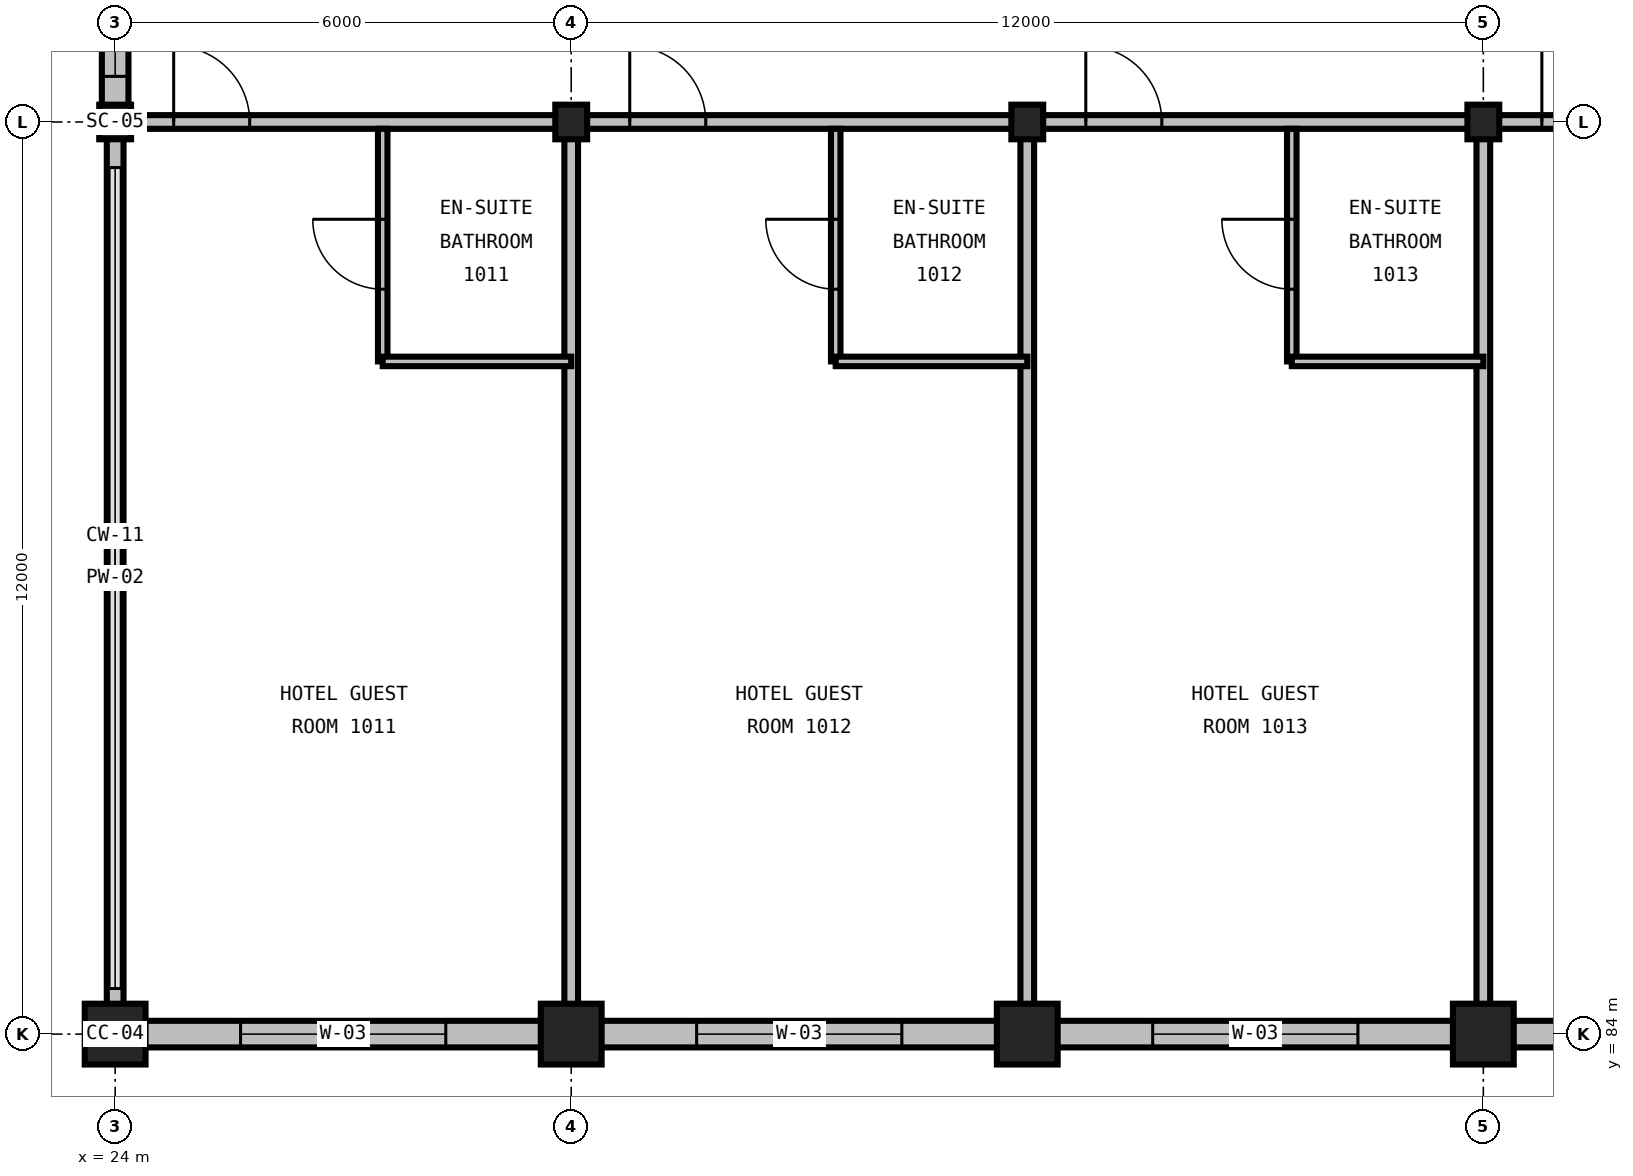
"""IFC4 building model, lengths in metres.
Left out: names, types, materials, properties, quantities, classifications, styles, units other than length and angle.
Written with IfcOpenShell. Run it as: python <this file> out.ifc"""

import sys

from ifc_helpers import new_model, si_unit, direction, frame, frame_2d, origin, origin_2d, place, context, subcontext, project, spatial, rectangle, i_section, extrude, element, fill, save


model = new_model("IFC4")
c1 = context("Model", 3, precision=1e-05, world=origin(), true_north=direction((0.0, 1.0)))
c2 = subcontext(c1, "Body", "Model", "MODEL_VIEW")
j1 = project(units=[si_unit("LENGTHUNIT", "METRE"), si_unit("PLANEANGLEUNIT", "RADIAN")], contexts=[c1])
p1 = place(None, origin())
s1 = spatial("IfcSite", under=j1, at=p1, CompositionType="ELEMENT")
p2 = place(p1, origin())
s2 = spatial("IfcBuilding", under=s1, at=p2, CompositionType="ELEMENT")
p3 = place(p2, frame((0.0, 0.0, 45.6)))
s3 = spatial("IfcBuildingStorey", under=s2, at=p3, CompositionType="ELEMENT", Elevation=45.6)
p4 = place(p3, frame((24.0, 84.0, 0.0), z_axis=(0.0, 0.0, 1.0), x_axis=(1.0, 0.0, 0.0)))
e1 = element("IfcColumn", 1, at=p4, inside=s3, PredefinedType="COLUMN", context=c2, shape_type="SweptSolid", body=[
    extrude(rectangle(XDim=0.8, YDim=0.8, at=origin_2d()), origin(), (0.0, 0.0, 1.0), 3.6),
])
p5 = place(p3, frame((24.0, 96.0, 0.0), z_axis=(0.0, 0.0, 1.0), x_axis=(1.0, 0.0, 0.0)))
e2 = element("IfcColumn", 2, at=p5, inside=s3, PredefinedType="COLUMN", context=c2, shape_type="SweptSolid", body=[
    extrude(i_section(OverallWidth=0.419, OverallDepth=0.455, WebThickness=0.042, FlangeThickness=0.068, FilletRadius=0.031, at=origin_2d()), origin(), (0.0, 0.0, 1.0), 3.6),
])
p6 = place(p3, frame((30.0, 84.0, 0.0), z_axis=(0.0, 0.0, 1.0), x_axis=(1.0, 0.0, 0.0)))
e3 = element("IfcColumn", 3, at=p6, inside=s3, PredefinedType="COLUMN", context=c2, shape_type="SweptSolid", body=[
    extrude(rectangle(XDim=0.8, YDim=0.8, at=origin_2d()), origin(), (0.0, 0.0, 1.0), 3.6),
])
p7 = place(p3, frame((30.0, 96.0, 0.0), z_axis=(0.0, 0.0, 1.0), x_axis=(1.0, 0.0, 0.0)))
e4 = element("IfcColumn", 4, at=p7, inside=s3, PredefinedType="COLUMN", context=c2, shape_type="SweptSolid", body=[
    extrude(i_section(OverallWidth=0.419, OverallDepth=0.455, WebThickness=0.042, FlangeThickness=0.068, FilletRadius=0.031, at=origin_2d()), origin(), (0.0, 0.0, 1.0), 3.6),
])
p8 = place(p3, frame((36.0, 84.0, 0.0), z_axis=(0.0, 0.0, 1.0), x_axis=(1.0, 0.0, 0.0)))
e5 = element("IfcColumn", 5, at=p8, inside=s3, PredefinedType="COLUMN", context=c2, shape_type="SweptSolid", body=[
    extrude(rectangle(XDim=0.8, YDim=0.8, at=origin_2d()), origin(), (0.0, 0.0, 1.0), 3.6),
])
p9 = place(p3, frame((36.0, 96.0, 0.0), z_axis=(0.0, 0.0, 1.0), x_axis=(1.0, 0.0, 0.0)))
e6 = element("IfcColumn", 6, at=p9, inside=s3, PredefinedType="COLUMN", context=c2, shape_type="SweptSolid", body=[
    extrude(i_section(OverallWidth=0.419, OverallDepth=0.455, WebThickness=0.042, FlangeThickness=0.068, FilletRadius=0.031, at=origin_2d()), origin(), (0.0, 0.0, 1.0), 3.6),
])
p10 = place(p3, frame((42.0, 84.0, 0.0), z_axis=(0.0, 0.0, 1.0), x_axis=(1.0, 0.0, 0.0)))
e7 = element("IfcColumn", 7, at=p10, inside=s3, PredefinedType="COLUMN", context=c2, shape_type="SweptSolid", body=[
    extrude(rectangle(XDim=0.8, YDim=0.8, at=origin_2d()), origin(), (0.0, 0.0, 1.0), 3.6),
])
p11 = place(p3, frame((42.0, 96.0, 0.0), z_axis=(0.0, 0.0, 1.0), x_axis=(1.0, 0.0, 0.0)))
e8 = element("IfcColumn", 8, at=p11, inside=s3, PredefinedType="COLUMN", context=c2, shape_type="SweptSolid", body=[
    extrude(i_section(OverallWidth=0.419, OverallDepth=0.455, WebThickness=0.042, FlangeThickness=0.068, FilletRadius=0.031, at=origin_2d()), origin(), (0.0, 0.0, 1.0), 3.6),
])
p12 = place(p3, frame((24.0, 84.0, 0.0), z_axis=(0.0, 0.0, 1.0), x_axis=(1.0, 0.0, 0.0)))
e9 = element("IfcWall", 9, at=p12, inside=s3, PredefinedType="STANDARD", context=c2, shape_type="SweptSolid", body=[
    extrude(rectangle(XDim=6.0, YDim=0.35, at=frame_2d((3.0, 0.0))), origin(), (0.0, 0.0, 1.0), 2.486),
])
p13 = place(p12, frame((1.65, 0.0, 0.72)))
e10 = element("IfcOpeningElement", 10, at=p13, cuts=e9, PredefinedType="OPENING", context=c2, shape_type="SweptSolid", body=[
    extrude(rectangle(XDim=2.7, YDim=1.65, at=frame_2d((1.35, 0.825))), frame((0.0, 0.19, 0.0), z_axis=(0.0, -1.0, 0.0), x_axis=(1.0, 0.0, 0.0)), (0.0, 0.0, 1.0), 0.38),
])
p14 = place(p3, frame((30.0, 84.0, 0.0), z_axis=(0.0, 0.0, 1.0), x_axis=(1.0, 0.0, 0.0)))
e11 = element("IfcWall", 11, at=p14, inside=s3, PredefinedType="STANDARD", context=c2, shape_type="SweptSolid", body=[
    extrude(rectangle(XDim=6.0, YDim=0.35, at=frame_2d((3.0, 0.0))), origin(), (0.0, 0.0, 1.0), 2.486),
])
p15 = place(p14, frame((1.65, 0.0, 0.72)))
e12 = element("IfcOpeningElement", 12, at=p15, cuts=e11, PredefinedType="OPENING", context=c2, shape_type="SweptSolid", body=[
    extrude(rectangle(XDim=2.7, YDim=1.65, at=frame_2d((1.35, 0.825))), frame((0.0, 0.19, 0.0), z_axis=(0.0, -1.0, 0.0), x_axis=(1.0, 0.0, 0.0)), (0.0, 0.0, 1.0), 0.38),
])
p16 = place(p3, frame((36.0, 84.0, 0.0), z_axis=(0.0, 0.0, 1.0), x_axis=(1.0, 0.0, 0.0)))
e13 = element("IfcWall", 13, at=p16, inside=s3, PredefinedType="STANDARD", context=c2, shape_type="SweptSolid", body=[
    extrude(rectangle(XDim=6.0, YDim=0.35, at=frame_2d((3.0, 0.0))), origin(), (0.0, 0.0, 1.0), 2.486),
])
p17 = place(p16, frame((1.65, 0.0, 0.72)))
e14 = element("IfcOpeningElement", 14, at=p17, cuts=e13, PredefinedType="OPENING", context=c2, shape_type="SweptSolid", body=[
    extrude(rectangle(XDim=2.7, YDim=1.65, at=frame_2d((1.35, 0.825))), frame((0.0, 0.19, 0.0), z_axis=(0.0, -1.0, 0.0), x_axis=(1.0, 0.0, 0.0)), (0.0, 0.0, 1.0), 0.38),
])
p18 = place(p3, frame((42.0, 84.0, 0.0), z_axis=(0.0, 0.0, 1.0), x_axis=(1.0, 0.0, 0.0)))
e15 = element("IfcWall", 15, at=p18, inside=s3, PredefinedType="STANDARD", context=c2, shape_type="SweptSolid", body=[
    extrude(rectangle(XDim=12.0, YDim=0.35, at=frame_2d((6.0, 0.0))), origin(), (0.0, 0.0, 1.0), 2.486),
])
p19 = place(p18, frame((1.65, 0.0, 0.72)))
e16 = element("IfcOpeningElement", 16, at=p19, cuts=e15, PredefinedType="OPENING", context=c2, shape_type="SweptSolid", body=[
    extrude(rectangle(XDim=2.7, YDim=1.65, at=frame_2d((1.35, 0.825))), frame((0.0, 0.19, 0.0), z_axis=(0.0, -1.0, 0.0), x_axis=(1.0, 0.0, 0.0)), (0.0, 0.0, 1.0), 0.38),
])
p20 = place(p18, frame((7.65, 0.0, 0.72)))
e17 = element("IfcOpeningElement", 17, at=p20, cuts=e15, PredefinedType="OPENING", context=c2, shape_type="SweptSolid", body=[
    extrude(rectangle(XDim=2.7, YDim=1.65, at=frame_2d((1.35, 0.825))), frame((0.0, 0.19, 0.0), z_axis=(0.0, -1.0, 0.0), x_axis=(1.0, 0.0, 0.0)), (0.0, 0.0, 1.0), 0.38),
])
p21 = place(p3, frame((24.0, 96.0, 0.0), z_axis=(0.0, 0.0, 1.0), x_axis=(0.0, -1.0, 0.0)))
e18 = element("IfcWall", 18, at=p21, inside=s3, PredefinedType="PARAPET", context=c2, shape_type="SweptSolid", body=[
    extrude(rectangle(XDim=12.0, YDim=0.22, at=frame_2d((6.0, 0.0))), origin(), (0.0, 0.0, 1.0), 0.2),
])
p22 = place(p3, frame((24.0, 105.0, 0.0), z_axis=(0.0, 0.0, 1.0), x_axis=(0.0, -1.0, 0.0)))
e19 = element("IfcWall", 19, at=p22, inside=s3, PredefinedType="STANDARD", context=c2, shape_type="SweptSolid", body=[
    extrude(rectangle(XDim=9.0, YDim=0.35, at=frame_2d((4.5, 0.0))), origin(), (0.0, 0.0, 1.0), 2.981),
])
p23 = place(p22, frame((6.6, 0.0, 0.85)))
e20 = element("IfcOpeningElement", 20, at=p23, cuts=e19, PredefinedType="OPENING", context=c2, shape_type="SweptSolid", body=[
    extrude(rectangle(XDim=1.8, YDim=1.5, at=frame_2d((0.9, 0.75))), frame((0.0, 0.19, 0.0), z_axis=(0.0, -1.0, 0.0), x_axis=(1.0, 0.0, 0.0)), (0.0, 0.0, 1.0), 0.38),
])
p24 = place(p3, frame((24.085, 96.0, 0.0), z_axis=(0.0, 0.0, 1.0), x_axis=(1.0, 0.0, 0.0)))
e21 = element("IfcWall", 21, at=p24, inside=s3, PredefinedType="PARTITIONING", context=c2, shape_type="SweptSolid", body=[
    extrude(rectangle(XDim=5.915, YDim=0.18, at=frame_2d((2.957, 0.0))), origin(), (0.0, 0.0, 1.0), 2.736),
])
p25 = place(p24, frame((0.685, 0.0, 0.0)))
e22 = element("IfcOpeningElement", 22, at=p25, cuts=e21, PredefinedType="OPENING", context=c2, shape_type="SweptSolid", body=[
    extrude(rectangle(XDim=1.0, YDim=2.15, at=frame_2d((0.5, 1.075))), frame((0.0, 0.105, 0.0), z_axis=(0.0, -1.0, 0.0), x_axis=(1.0, 0.0, 0.0)), (0.0, 0.0, 1.0), 0.21),
])
p26 = place(p3, frame((30.0, 84.175, 0.0), z_axis=(0.0, 0.0, 1.0), x_axis=(0.0, 1.0, 0.0)))
e23 = element("IfcWall", 23, at=p26, inside=s3, PredefinedType="PARTITIONING", context=c2, shape_type="SweptSolid", body=[
    extrude(rectangle(XDim=11.825, YDim=0.18, at=frame_2d((5.913, 0.0))), origin(), (0.0, 0.0, 1.0), 2.59),
])
p27 = place(p3, frame((27.52, 92.85, 0.0), z_axis=(0.0, 0.0, 1.0), x_axis=(0.0, 1.0, 0.0)))
e24 = element("IfcWall", 24, at=p27, inside=s3, PredefinedType="PARTITIONING", context=c2, shape_type="SweptSolid", body=[
    extrude(rectangle(XDim=3.06, YDim=0.125, at=frame_2d((1.53, 0.0))), origin(), (0.0, 0.0, 1.0), 3.29),
])
p28 = place(p27, frame((0.95, 0.0, 0.0)))
e25 = element("IfcOpeningElement", 25, at=p28, cuts=e24, PredefinedType="OPENING", context=c2, shape_type="SweptSolid", body=[
    extrude(rectangle(XDim=0.92, YDim=2.1, at=frame_2d((0.46, 1.05))), frame((0.0, 0.077, 0.0), z_axis=(0.0, -1.0, 0.0), x_axis=(1.0, 0.0, 0.0)), (0.0, 0.0, 1.0), 0.155),
])
p29 = place(p3, frame((27.52, 92.85, 0.0), z_axis=(0.0, 0.0, 1.0), x_axis=(1.0, 0.0, 0.0)))
e26 = element("IfcWall", 26, at=p29, inside=s3, PredefinedType="PARTITIONING", context=c2, shape_type="SweptSolid", body=[
    extrude(rectangle(XDim=2.48, YDim=0.125, at=frame_2d((1.24, 0.0))), origin(), (0.0, 0.0, 1.0), 3.29),
])
p30 = place(p3, frame((30.0, 96.0, 0.0), z_axis=(0.0, 0.0, 1.0), x_axis=(1.0, 0.0, 0.0)))
e27 = element("IfcWall", 27, at=p30, inside=s3, PredefinedType="PARTITIONING", context=c2, shape_type="SweptSolid", body=[
    extrude(rectangle(XDim=6.0, YDim=0.18, at=frame_2d((3.0, 0.0))), origin(), (0.0, 0.0, 1.0), 2.736),
])
p31 = place(p30, frame((0.77, 0.0, 0.0)))
e28 = element("IfcOpeningElement", 28, at=p31, cuts=e27, PredefinedType="OPENING", context=c2, shape_type="SweptSolid", body=[
    extrude(rectangle(XDim=1.0, YDim=2.15, at=frame_2d((0.5, 1.075))), frame((0.0, 0.105, 0.0), z_axis=(0.0, -1.0, 0.0), x_axis=(1.0, 0.0, 0.0)), (0.0, 0.0, 1.0), 0.21),
])
p32 = place(p3, frame((36.0, 84.175, 0.0), z_axis=(0.0, 0.0, 1.0), x_axis=(0.0, 1.0, 0.0)))
e29 = element("IfcWall", 29, at=p32, inside=s3, PredefinedType="PARTITIONING", context=c2, shape_type="SweptSolid", body=[
    extrude(rectangle(XDim=11.825, YDim=0.18, at=frame_2d((5.913, 0.0))), origin(), (0.0, 0.0, 1.0), 2.59),
])
p33 = place(p3, frame((33.48, 92.85, 0.0), z_axis=(0.0, 0.0, 1.0), x_axis=(0.0, 1.0, 0.0)))
e30 = element("IfcWall", 30, at=p33, inside=s3, PredefinedType="PARTITIONING", context=c2, shape_type="SweptSolid", body=[
    extrude(rectangle(XDim=3.06, YDim=0.125, at=frame_2d((1.53, 0.0))), origin(), (0.0, 0.0, 1.0), 3.29),
])
p34 = place(p33, frame((0.95, 0.0, 0.0)))
e31 = element("IfcOpeningElement", 31, at=p34, cuts=e30, PredefinedType="OPENING", context=c2, shape_type="SweptSolid", body=[
    extrude(rectangle(XDim=0.92, YDim=2.1, at=frame_2d((0.46, 1.05))), frame((0.0, 0.077, 0.0), z_axis=(0.0, -1.0, 0.0), x_axis=(1.0, 0.0, 0.0)), (0.0, 0.0, 1.0), 0.155),
])
p35 = place(p3, frame((33.48, 92.85, 0.0), z_axis=(0.0, 0.0, 1.0), x_axis=(1.0, 0.0, 0.0)))
e32 = element("IfcWall", 32, at=p35, inside=s3, PredefinedType="PARTITIONING", context=c2, shape_type="SweptSolid", body=[
    extrude(rectangle(XDim=2.52, YDim=0.125, at=frame_2d((1.26, 0.0))), origin(), (0.0, 0.0, 1.0), 3.29),
])
p36 = place(p3, frame((36.0, 96.0, 0.0), z_axis=(0.0, 0.0, 1.0), x_axis=(1.0, 0.0, 0.0)))
e33 = element("IfcWall", 33, at=p36, inside=s3, PredefinedType="PARTITIONING", context=c2, shape_type="SweptSolid", body=[
    extrude(rectangle(XDim=6.0, YDim=0.18, at=frame_2d((3.0, 0.0))), origin(), (0.0, 0.0, 1.0), 2.736),
])
p37 = place(p36, frame((0.77, 0.0, 0.0)))
e34 = element("IfcOpeningElement", 34, at=p37, cuts=e33, PredefinedType="OPENING", context=c2, shape_type="SweptSolid", body=[
    extrude(rectangle(XDim=1.0, YDim=2.15, at=frame_2d((0.5, 1.075))), frame((0.0, 0.105, 0.0), z_axis=(0.0, -1.0, 0.0), x_axis=(1.0, 0.0, 0.0)), (0.0, 0.0, 1.0), 0.21),
])
p38 = place(p3, frame((42.0, 84.175, 0.0), z_axis=(0.0, 0.0, 1.0), x_axis=(0.0, 1.0, 0.0)))
e35 = element("IfcWall", 35, at=p38, inside=s3, PredefinedType="PARTITIONING", context=c2, shape_type="SweptSolid", body=[
    extrude(rectangle(XDim=11.825, YDim=0.18, at=frame_2d((5.913, 0.0))), origin(), (0.0, 0.0, 1.0), 2.59),
])
p39 = place(p3, frame((39.48, 92.85, 0.0), z_axis=(0.0, 0.0, 1.0), x_axis=(0.0, 1.0, 0.0)))
e36 = element("IfcWall", 36, at=p39, inside=s3, PredefinedType="PARTITIONING", context=c2, shape_type="SweptSolid", body=[
    extrude(rectangle(XDim=3.06, YDim=0.125, at=frame_2d((1.53, 0.0))), origin(), (0.0, 0.0, 1.0), 3.29),
])
p40 = place(p39, frame((0.95, 0.0, 0.0)))
e37 = element("IfcOpeningElement", 37, at=p40, cuts=e36, PredefinedType="OPENING", context=c2, shape_type="SweptSolid", body=[
    extrude(rectangle(XDim=0.92, YDim=2.1, at=frame_2d((0.46, 1.05))), frame((0.0, 0.077, 0.0), z_axis=(0.0, -1.0, 0.0), x_axis=(1.0, 0.0, 0.0)), (0.0, 0.0, 1.0), 0.155),
])
p41 = place(p3, frame((39.48, 92.85, 0.0), z_axis=(0.0, 0.0, 1.0), x_axis=(1.0, 0.0, 0.0)))
e38 = element("IfcWall", 38, at=p41, inside=s3, PredefinedType="PARTITIONING", context=c2, shape_type="SweptSolid", body=[
    extrude(rectangle(XDim=2.52, YDim=0.125, at=frame_2d((1.26, 0.0))), origin(), (0.0, 0.0, 1.0), 3.29),
])
p42 = place(p3, frame((42.0, 96.0, 0.0), z_axis=(0.0, 0.0, 1.0), x_axis=(1.0, 0.0, 0.0)))
e39 = element("IfcWall", 39, at=p42, inside=s3, PredefinedType="PARTITIONING", context=c2, shape_type="SweptSolid", body=[
    extrude(rectangle(XDim=6.0, YDim=0.18, at=frame_2d((3.0, 0.0))), origin(), (0.0, 0.0, 1.0), 2.359),
])
p43 = place(p42, frame((0.77, 0.0, 0.0)))
e40 = element("IfcOpeningElement", 40, at=p43, cuts=e39, PredefinedType="OPENING", context=c2, shape_type="SweptSolid", body=[
    extrude(rectangle(XDim=1.0, YDim=2.15, at=frame_2d((0.5, 1.075))), frame((0.0, 0.105, 0.0), z_axis=(0.0, -1.0, 0.0), x_axis=(1.0, 0.0, 0.0)), (0.0, 0.0, 1.0), 0.21),
])
p44 = place(p13, origin())
e41 = element("IfcWindow", 41, at=p44, inside=s3, PartitioningType="TRIPLE_PANEL_VERTICAL", PredefinedType="WINDOW", context=c2, shape_type="SweptSolid", body=[
    extrude(rectangle(XDim=2.7, YDim=1.65, at=frame_2d((1.35, 0.825))), frame((0.0, 0.03, 0.0), z_axis=(0.0, -1.0, 0.0), x_axis=(1.0, 0.0, 0.0)), (0.0, 0.0, 1.0), 0.06),
])
fill(e10, e41)
p45 = place(p15, origin())
e42 = element("IfcWindow", 42, at=p45, inside=s3, PartitioningType="TRIPLE_PANEL_VERTICAL", PredefinedType="WINDOW", context=c2, shape_type="SweptSolid", body=[
    extrude(rectangle(XDim=2.7, YDim=1.65, at=frame_2d((1.35, 0.825))), frame((0.0, 0.03, 0.0), z_axis=(0.0, -1.0, 0.0), x_axis=(1.0, 0.0, 0.0)), (0.0, 0.0, 1.0), 0.06),
])
fill(e12, e42)
p46 = place(p17, origin())
e43 = element("IfcWindow", 43, at=p46, inside=s3, PartitioningType="TRIPLE_PANEL_VERTICAL", PredefinedType="WINDOW", context=c2, shape_type="SweptSolid", body=[
    extrude(rectangle(XDim=2.7, YDim=1.65, at=frame_2d((1.35, 0.825))), frame((0.0, 0.03, 0.0), z_axis=(0.0, -1.0, 0.0), x_axis=(1.0, 0.0, 0.0)), (0.0, 0.0, 1.0), 0.06),
])
fill(e14, e43)
p47 = place(p23, origin())
e44 = element("IfcWindow", 44, at=p47, inside=s3, PartitioningType="SINGLE_PANEL", PredefinedType="WINDOW", context=c2, shape_type="SweptSolid", body=[
    extrude(rectangle(XDim=1.8, YDim=1.5, at=frame_2d((0.9, 0.75))), frame((0.0, 0.03, 0.0), z_axis=(0.0, -1.0, 0.0), x_axis=(1.0, 0.0, 0.0)), (0.0, 0.0, 1.0), 0.06),
])
fill(e20, e44)
p48 = place(p25, origin())
e45 = element("IfcDoor", 45, at=p48, inside=s3, OperationType="SINGLE_SWING_LEFT", PredefinedType="DOOR", context=c2, shape_type="SweptSolid", body=[
    extrude(rectangle(XDim=1.0, YDim=2.15, at=frame_2d((0.5, 1.075))), frame((0.0, 0.025, 0.0), z_axis=(0.0, -1.0, 0.0), x_axis=(1.0, 0.0, 0.0)), (0.0, 0.0, 1.0), 0.05),
])
fill(e22, e45)
p49 = place(p28, origin())
e46 = element("IfcDoor", 46, at=p49, inside=s3, OperationType="SINGLE_SWING_RIGHT", PredefinedType="DOOR", context=c2, shape_type="SweptSolid", body=[
    extrude(rectangle(XDim=0.92, YDim=2.1, at=frame_2d((0.46, 1.05))), frame((0.0, 0.025, 0.0), z_axis=(0.0, -1.0, 0.0), x_axis=(1.0, 0.0, 0.0)), (0.0, 0.0, 1.0), 0.05),
])
fill(e25, e46)
p50 = place(p31, origin())
e47 = element("IfcDoor", 47, at=p50, inside=s3, OperationType="SINGLE_SWING_LEFT", PredefinedType="DOOR", context=c2, shape_type="SweptSolid", body=[
    extrude(rectangle(XDim=1.0, YDim=2.15, at=frame_2d((0.5, 1.075))), frame((0.0, 0.025, 0.0), z_axis=(0.0, -1.0, 0.0), x_axis=(1.0, 0.0, 0.0)), (0.0, 0.0, 1.0), 0.05),
])
fill(e28, e47)
p51 = place(p34, origin())
e48 = element("IfcDoor", 48, at=p51, inside=s3, OperationType="SINGLE_SWING_RIGHT", PredefinedType="DOOR", context=c2, shape_type="SweptSolid", body=[
    extrude(rectangle(XDim=0.92, YDim=2.1, at=frame_2d((0.46, 1.05))), frame((0.0, 0.025, 0.0), z_axis=(0.0, -1.0, 0.0), x_axis=(1.0, 0.0, 0.0)), (0.0, 0.0, 1.0), 0.05),
])
fill(e31, e48)
p52 = place(p37, origin())
e49 = element("IfcDoor", 49, at=p52, inside=s3, OperationType="SINGLE_SWING_LEFT", PredefinedType="DOOR", context=c2, shape_type="SweptSolid", body=[
    extrude(rectangle(XDim=1.0, YDim=2.15, at=frame_2d((0.5, 1.075))), frame((0.0, 0.025, 0.0), z_axis=(0.0, -1.0, 0.0), x_axis=(1.0, 0.0, 0.0)), (0.0, 0.0, 1.0), 0.05),
])
fill(e34, e49)
p53 = place(p40, origin())
e50 = element("IfcDoor", 50, at=p53, inside=s3, OperationType="SINGLE_SWING_RIGHT", PredefinedType="DOOR", context=c2, shape_type="SweptSolid", body=[
    extrude(rectangle(XDim=0.92, YDim=2.1, at=frame_2d((0.46, 1.05))), frame((0.0, 0.025, 0.0), z_axis=(0.0, -1.0, 0.0), x_axis=(1.0, 0.0, 0.0)), (0.0, 0.0, 1.0), 0.05),
])
fill(e37, e50)
p54 = place(p43, origin())
e51 = element("IfcDoor", 51, at=p54, inside=s3, OperationType="SINGLE_SWING_LEFT", PredefinedType="DOOR", context=c2, shape_type="SweptSolid", body=[
    extrude(rectangle(XDim=1.0, YDim=2.15, at=frame_2d((0.5, 1.075))), frame((0.0, 0.025, 0.0), z_axis=(0.0, -1.0, 0.0), x_axis=(1.0, 0.0, 0.0)), (0.0, 0.0, 1.0), 0.05),
])
fill(e40, e51)
save(model, sys.argv[1])
